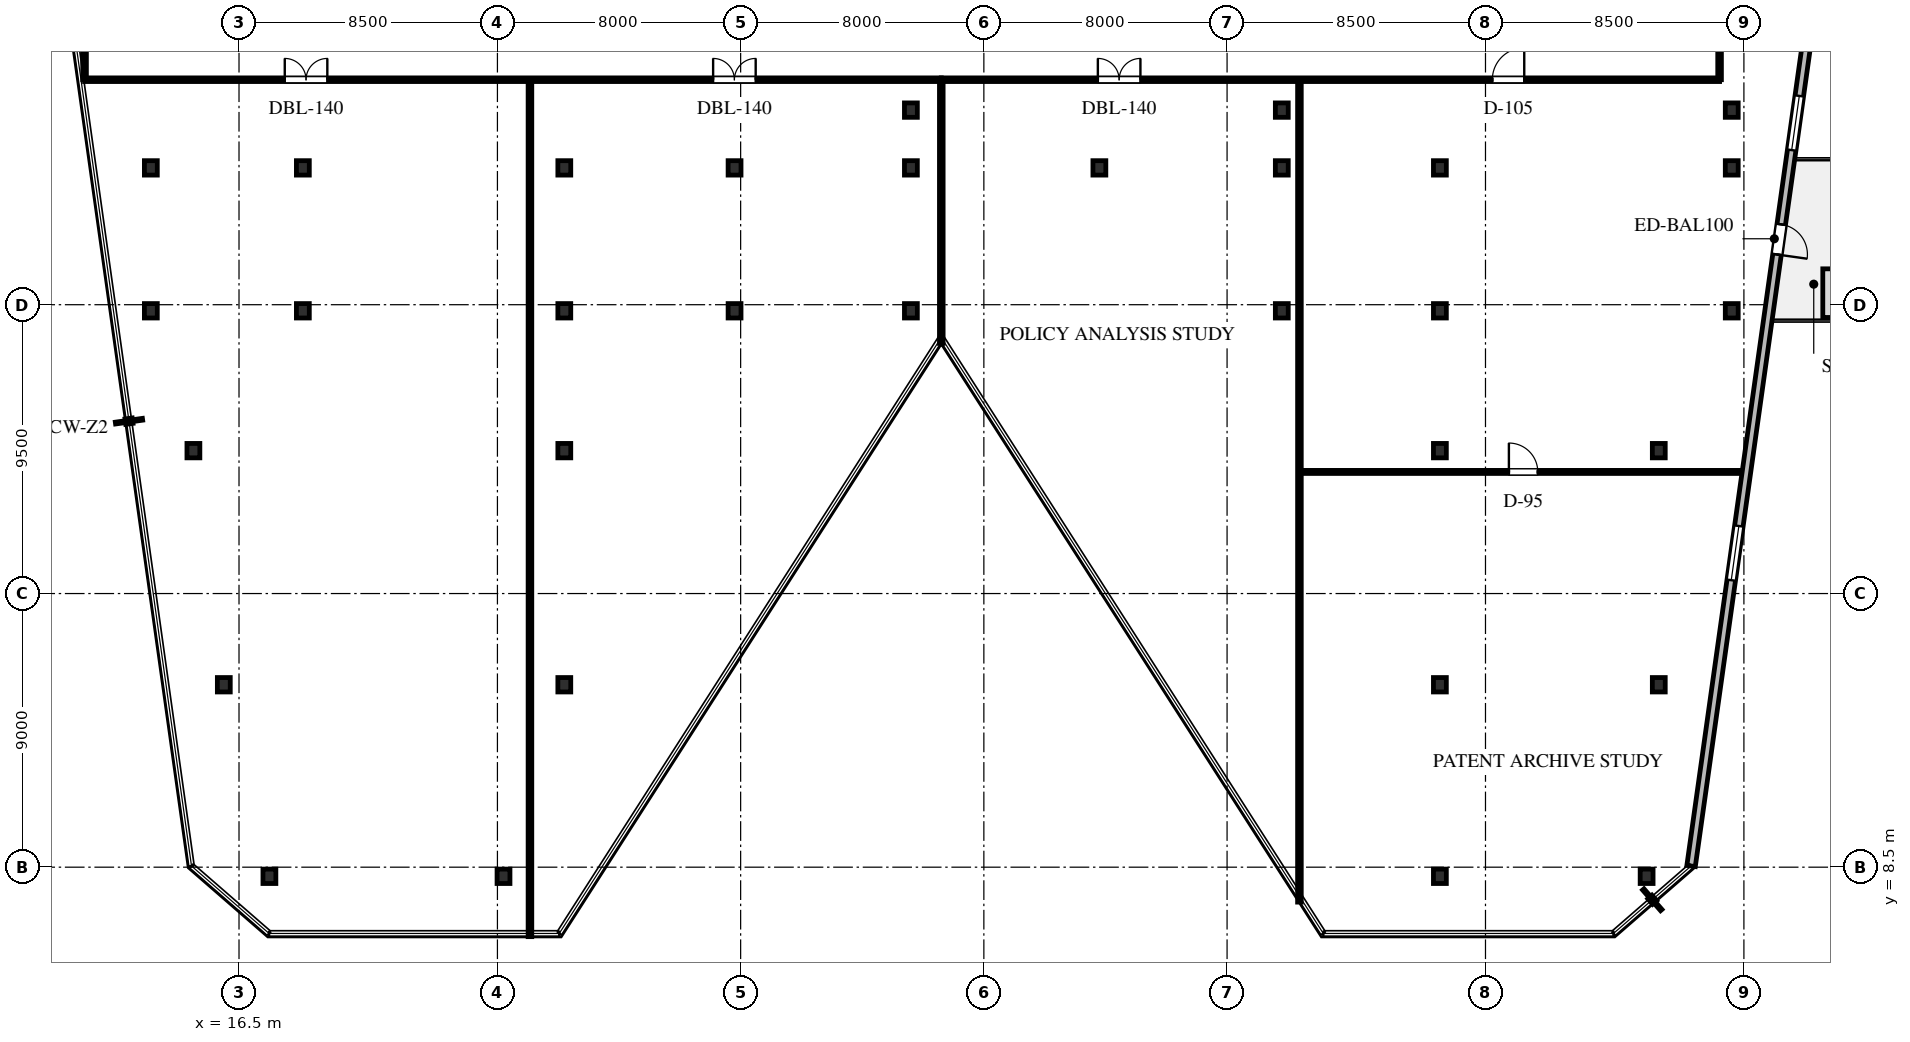
"""IFC4 building model, lengths in metres.
Left out: names, types, materials, properties, quantities, classifications, styles, units other than length and angle.
Written with IfcOpenShell. Run it as: python <this file> out.ifc"""

import sys

from ifc_helpers import new_model, si_unit, direction, frame, frame_2d, origin, origin_2d, place, context, subcontext, project, spatial, rectangle, i_section, extrude, element, fill, save


model = new_model("IFC4")
c1 = context("Model", 3, precision=1e-05, world=origin(), true_north=direction((0.0, 1.0)))
c2 = subcontext(c1, "Body", "Model", "MODEL_VIEW")
j1 = project(units=[si_unit("LENGTHUNIT", "METRE"), si_unit("PLANEANGLEUNIT", "RADIAN")], contexts=[c1])
p1 = place(None, origin())
s1 = spatial("IfcSite", under=j1, at=p1, CompositionType="ELEMENT")
p2 = place(p1, origin())
s2 = spatial("IfcBuilding", under=s1, at=p2, CompositionType="ELEMENT")
p3 = place(p2, frame((0.0, 0.0, 124.0)))
s3 = spatial("IfcBuildingStorey", under=s2, at=p3, CompositionType="ELEMENT", Elevation=124.0)
for number, where, z_axis, x_axis in (
    (1, (17.5, 8.2, 0.0), (0.0, 0.0, 1.0), (1.0, 0.0, 0.0)),
    (2, (13.6, 26.8, 0.0), (0.0, 0.0, 1.0), (1.0, 0.0, 0.0)),
    (3, (18.6, 26.8, 0.0), (0.0, 0.0, 1.0), (1.0, 0.0, 0.0)),
    (4, (27.2, 26.8, 0.0), (0.0, 0.0, 1.0), (1.0, 0.0, 0.0)),
    (5, (32.8, 26.8, 0.0), (0.0, 0.0, 1.0), (1.0, 0.0, 0.0)),
    (6, (38.6, 26.8, 0.0), (0.0, 0.0, 1.0), (1.0, 0.0, 0.0)),
    (7, (50.8, 26.8, 0.0), (0.0, 0.0, 1.0), (1.0, 0.0, 0.0)),
    (8, (56.0, 26.8, 0.0), (0.0, 0.0, 1.0), (1.0, 0.0, 0.0)),
    (9, (65.6, 26.8, 0.0), (0.0, 0.0, 1.0), (1.0, 0.0, 0.0)),
    (10, (13.6, 31.5, 0.0), (0.0, 0.0, 1.0), (1.0, 0.0, 0.0)),
    (11, (18.6, 31.5, 0.0), (0.0, 0.0, 1.0), (1.0, 0.0, 0.0)),
    (12, (27.2, 31.5, 0.0), (0.0, 0.0, 1.0), (1.0, 0.0, 0.0)),
    (13, (25.2, 8.2, 0.0), (0.0, 0.0, 1.0), (1.0, 0.0, 0.0)),
    (14, (32.8, 31.5, 0.0), (0.0, 0.0, 1.0), (1.0, 0.0, 0.0)),
    (15, (38.6, 31.5, 0.0), (0.0, 0.0, 1.0), (1.0, 0.0, 0.0)),
    (16, (44.8, 31.5, 0.0), (0.0, 0.0, 1.0), (1.0, 0.0, 0.0)),
    (17, (50.8, 31.5, 0.0), (0.0, 0.0, 1.0), (1.0, 0.0, 0.0)),
    (18, (56.0, 31.5, 0.0), (0.0, 0.0, 1.0), (1.0, 0.0, 0.0)),
    (19, (65.6, 31.5, 0.0), (0.0, 0.0, 1.0), (1.0, 0.0, 0.0)),
    (20, (56.0, 8.2, 0.0), (0.0, 0.0, 1.0), (1.0, 0.0, 0.0)),
    (21, (62.8, 8.2, 0.0), (0.0, 0.0, 1.0), (1.0, 0.0, 0.0)),
    (22, (16.0, 14.5, 0.0), (0.0, 0.0, 1.0), (1.0, 0.0, 0.0)),
    (23, (27.2, 14.5, 0.0), (0.0, 0.0, 1.0), (1.0, 0.0, 0.0)),
    (24, (56.0, 14.5, 0.0), (0.0, 0.0, 1.0), (1.0, 0.0, 0.0)),
    (25, (63.2, 14.5, 0.0), (0.0, 0.0, 1.0), (1.0, 0.0, 0.0)),
    (26, (15.0, 22.2, 0.0), (0.0, 0.0, 1.0), (1.0, 0.0, 0.0)),
    (27, (27.2, 22.2, 0.0), (0.0, 0.0, 1.0), (1.0, 0.0, 0.0)),
    (28, (56.0, 22.2, 0.0), (0.0, 0.0, 1.0), (1.0, 0.0, 0.0)),
    (29, (63.2, 22.2, 0.0), (0.0, 0.0, 1.0), (1.0, 0.0, 0.0)),
    (30, (38.6, 33.4, 0.0), (0.0, 0.0, 1.0), (1.0, 0.0, 0.0)),
    (31, (50.8, 33.4, 0.0), (0.0, 0.0, 1.0), (1.0, 0.0, 0.0)),
    (32, (65.6, 33.4, 0.0), (0.0, 0.0, 1.0), (1.0, 0.0, 0.0)),
):
    element("IfcColumn", number, at=place(p3, frame(where, z_axis=z_axis, x_axis=x_axis)), inside=s3, PredefinedType="COLUMN", context=c2, shape_type="SweptSolid", body=[
        extrude(i_section(OverallWidth=0.424, OverallDepth=0.474, WebThickness=0.048, FlangeThickness=0.077, FilletRadius=0.03, at=origin_2d()), origin(), (0.0, 0.0, 1.0), 4.0),
    ])
p4 = place(p3, frame((68.375, 37.8, 0.0), z_axis=(0.0, 0.0, 1.0), x_axis=(-0.13917001236, -0.990268502811, 0.0)))
e33 = element("IfcWall", 33, at=p4, inside=s3, PredefinedType="STANDARD", context=c2, shape_type="SweptSolid", body=[
    extrude(rectangle(XDim=29.549, YDim=0.28, at=frame_2d((14.774, 0.0))), origin(), (0.0, 0.0, 1.0), 3.75),
])
p5 = place(p4, frame((8.238, 0.0, 0.0)))
e34 = element("IfcOpeningElement", 34, at=p5, cuts=e33, PredefinedType="OPENING", context=c2, shape_type="SweptSolid", body=[
    extrude(rectangle(XDim=1.0, YDim=2.15, at=frame_2d((0.5, 1.075))), frame((0.0, 0.15, 0.0), z_axis=(0.0, -1.0, 0.0), x_axis=(1.0, 0.0, 0.0)), (0.0, 0.0, 1.0), 0.3),
])
p6 = place(p4, frame((3.971, 0.0, 0.65)))
e35 = element("IfcOpeningElement", 35, at=p6, cuts=e33, PredefinedType="OPENING", context=c2, shape_type="SweptSolid", body=[
    extrude(rectangle(XDim=1.8, YDim=2.1, at=frame_2d((0.9, 1.05))), frame((0.0, 0.15, 0.0), z_axis=(0.0, -1.0, 0.0), x_axis=(1.0, 0.0, 0.0)), (0.0, 0.0, 1.0), 0.3),
])
p7 = place(p4, frame((18.256, 0.0, 0.65)))
e36 = element("IfcOpeningElement", 36, at=p7, cuts=e33, PredefinedType="OPENING", context=c2, shape_type="SweptSolid", body=[
    extrude(rectangle(XDim=1.8, YDim=2.1, at=frame_2d((0.9, 1.05))), frame((0.0, 0.15, 0.0), z_axis=(0.0, -1.0, 0.0), x_axis=(1.0, 0.0, 0.0)), (0.0, 0.0, 1.0), 0.3),
])
p8 = place(p3, frame((11.42, 34.4, 0.0), z_axis=(0.0, 0.0, 1.0), x_axis=(1.0, 0.0, 0.0)))
e37 = element("IfcWall", 37, at=p8, inside=s3, PredefinedType="PARTITIONING", context=c2, shape_type="SweptSolid", body=[
    extrude(rectangle(XDim=28.18, YDim=0.12, at=frame_2d((14.09, 0.0))), origin(), (0.0, 0.0, 1.0), 2.894),
])
p9 = place(p8, frame((6.585, 0.0, 0.0)))
e38 = element("IfcOpeningElement", 38, at=p9, cuts=e37, PredefinedType="OPENING", context=c2, shape_type="SweptSolid", body=[
    extrude(rectangle(XDim=1.4, YDim=2.2, at=frame_2d((0.7, 1.1))), frame((0.0, 0.07, 0.0), z_axis=(0.0, -1.0, 0.0), x_axis=(1.0, 0.0, 0.0)), (0.0, 0.0, 1.0), 0.14),
])
p10 = place(p8, frame((20.675, 0.0, 0.0)))
e39 = element("IfcOpeningElement", 39, at=p10, cuts=e37, PredefinedType="OPENING", context=c2, shape_type="SweptSolid", body=[
    extrude(rectangle(XDim=1.4, YDim=2.2, at=frame_2d((0.7, 1.1))), frame((0.0, 0.07, 0.0), z_axis=(0.0, -1.0, 0.0), x_axis=(1.0, 0.0, 0.0)), (0.0, 0.0, 1.0), 0.14),
])
p11 = place(p3, frame((39.6, 34.4, 0.0), z_axis=(0.0, 0.0, 1.0), x_axis=(1.0, 0.0, 0.0)))
e40 = element("IfcWall", 40, at=p11, inside=s3, PredefinedType="PARTITIONING", context=c2, shape_type="SweptSolid", body=[
    extrude(rectangle(XDim=25.6, YDim=0.12, at=frame_2d((12.8, 0.0))), origin(), (0.0, 0.0, 1.0), 2.894),
])
p12 = place(p11, frame((5.15, 0.0, 0.0)))
e41 = element("IfcOpeningElement", 41, at=p12, cuts=e40, PredefinedType="OPENING", context=c2, shape_type="SweptSolid", body=[
    extrude(rectangle(XDim=1.4, YDim=2.2, at=frame_2d((0.7, 1.1))), frame((0.0, 0.07, 0.0), z_axis=(0.0, -1.0, 0.0), x_axis=(1.0, 0.0, 0.0)), (0.0, 0.0, 1.0), 0.14),
])
p13 = place(p11, frame((18.125, 0.0, 0.0)))
e42 = element("IfcOpeningElement", 42, at=p13, cuts=e40, PredefinedType="OPENING", context=c2, shape_type="SweptSolid", body=[
    extrude(rectangle(XDim=1.05, YDim=2.2, at=frame_2d((0.525, 1.1))), frame((0.0, 0.07, 0.0), z_axis=(0.0, -1.0, 0.0), x_axis=(1.0, 0.0, 0.0)), (0.0, 0.0, 1.0), 0.14),
])
p14 = place(p3, frame((11.42, 34.4, 0.0), z_axis=(0.0, 0.0, 1.0), x_axis=(0.0, 1.0, 0.0)))
e43 = element("IfcWall", 43, at=p14, inside=s3, PredefinedType="PARTITIONING", context=c2, shape_type="SweptSolid", body=[
    extrude(rectangle(XDim=3.65, YDim=0.12, at=frame_2d((1.825, 0.0))), origin(), (0.0, 0.0, 1.0), 3.75),
])
p15 = place(p3, frame((65.2, 34.4, 0.0), z_axis=(0.0, 0.0, 1.0), x_axis=(0.0, 1.0, 0.0)))
e44 = element("IfcWall", 44, at=p15, inside=s3, PredefinedType="PARTITIONING", context=c2, shape_type="SweptSolid", body=[
    extrude(rectangle(XDim=3.267, YDim=0.12, at=frame_2d((1.634, 0.0))), origin(), (0.0, 0.0, 1.0), 2.894),
])
p16 = place(p3, frame((39.6, 25.728, 0.0), z_axis=(0.0, 0.0, 1.0), x_axis=(0.0, 1.0, 0.0)))
e45 = element("IfcWall", 45, at=p16, inside=s3, PredefinedType="PARTITIONING", context=c2, shape_type="SweptSolid", body=[
    extrude(rectangle(XDim=8.672, YDim=0.12, at=frame_2d((4.336, 0.0))), origin(), (0.0, 0.0, 1.0), 2.894),
])
p17 = place(p3, frame((26.07, 6.215, 0.0), z_axis=(0.0, 0.0, 1.0), x_axis=(0.0, 1.0, 0.0)))
e46 = element("IfcWall", 46, at=p17, inside=s3, PredefinedType="PARTITIONING", context=c2, shape_type="SweptSolid", body=[
    extrude(rectangle(XDim=28.117, YDim=0.12, at=frame_2d((14.059, 0.0))), origin(), (0.0, 0.0, 1.0), 2.894),
])
p18 = place(p3, frame((51.38, 7.351, 0.0), z_axis=(0.0, 0.0, 1.0), x_axis=(0.0, 1.0, 0.0)))
e47 = element("IfcWall", 47, at=p18, inside=s3, PredefinedType="PARTITIONING", context=c2, shape_type="SweptSolid", body=[
    extrude(rectangle(XDim=26.981, YDim=0.12, at=frame_2d((13.49, 0.0))), origin(), (0.0, 0.0, 1.0), 2.894),
])
p19 = place(p3, frame((51.448, 21.5, 0.0), z_axis=(0.0, 0.0, 1.0), x_axis=(1.0, 0.0, 0.0)))
e48 = element("IfcWall", 48, at=p19, inside=s3, PredefinedType="PARTITIONING", context=c2, shape_type="SweptSolid", body=[
    extrude(rectangle(XDim=14.469, YDim=0.1, at=frame_2d((7.235, 0.0))), origin(), (0.0, 0.0, 1.0), 2.894),
])
p20 = place(p19, frame((6.822, 0.0, 0.0)))
e49 = element("IfcOpeningElement", 49, at=p20, cuts=e48, PredefinedType="OPENING", context=c2, shape_type="SweptSolid", body=[
    extrude(rectangle(XDim=0.95, YDim=2.15, at=frame_2d((0.475, 1.075))), frame((0.0, 0.06, 0.0), z_axis=(0.0, -1.0, 0.0), x_axis=(1.0, 0.0, 0.0)), (0.0, 0.0, 1.0), 0.12),
])
p21 = place(p5, origin())
e50 = element("IfcDoor", 50, at=p21, inside=s3, OperationType="SINGLE_SWING_RIGHT", PredefinedType="DOOR", context=c2, shape_type="SweptSolid", body=[
    extrude(rectangle(XDim=1.0, YDim=2.15, at=frame_2d((0.5, 1.075))), frame((0.0, 0.025, 0.0), z_axis=(0.0, -1.0, 0.0), x_axis=(1.0, 0.0, 0.0)), (0.0, 0.0, 1.0), 0.05),
])
fill(e34, e50)
p22 = place(p6, origin())
e51 = element("IfcWindow", 51, at=p22, inside=s3, PartitioningType="SINGLE_PANEL", PredefinedType="WINDOW", context=c2, shape_type="SweptSolid", body=[
    extrude(rectangle(XDim=1.8, YDim=2.1, at=frame_2d((0.9, 1.05))), frame((0.0, 0.03, 0.0), z_axis=(0.0, -1.0, 0.0), x_axis=(1.0, 0.0, 0.0)), (0.0, 0.0, 1.0), 0.06),
])
fill(e35, e51)
p23 = place(p7, origin())
e52 = element("IfcWindow", 52, at=p23, inside=s3, PartitioningType="SINGLE_PANEL", PredefinedType="WINDOW", context=c2, shape_type="SweptSolid", body=[
    extrude(rectangle(XDim=1.8, YDim=2.1, at=frame_2d((0.9, 1.05))), frame((0.0, 0.03, 0.0), z_axis=(0.0, -1.0, 0.0), x_axis=(1.0, 0.0, 0.0)), (0.0, 0.0, 1.0), 0.06),
])
fill(e36, e52)
p24 = place(p9, origin())
e53 = element("IfcDoor", 53, at=p24, inside=s3, OperationType="DOUBLE_DOOR_SINGLE_SWING", PredefinedType="DOOR", context=c2, shape_type="SweptSolid", body=[
    extrude(rectangle(XDim=1.4, YDim=2.2, at=frame_2d((0.7, 1.1))), frame((0.0, 0.025, 0.0), z_axis=(0.0, -1.0, 0.0), x_axis=(1.0, 0.0, 0.0)), (0.0, 0.0, 1.0), 0.05),
])
fill(e38, e53)
p25 = place(p10, origin())
e54 = element("IfcDoor", 54, at=p25, inside=s3, OperationType="DOUBLE_DOOR_SINGLE_SWING", PredefinedType="DOOR", context=c2, shape_type="SweptSolid", body=[
    extrude(rectangle(XDim=1.4, YDim=2.2, at=frame_2d((0.7, 1.1))), frame((0.0, 0.025, 0.0), z_axis=(0.0, -1.0, 0.0), x_axis=(1.0, 0.0, 0.0)), (0.0, 0.0, 1.0), 0.05),
])
fill(e39, e54)
p26 = place(p12, origin())
e55 = element("IfcDoor", 55, at=p26, inside=s3, OperationType="DOUBLE_DOOR_SINGLE_SWING", PredefinedType="DOOR", context=c2, shape_type="SweptSolid", body=[
    extrude(rectangle(XDim=1.4, YDim=2.2, at=frame_2d((0.7, 1.1))), frame((0.0, 0.025, 0.0), z_axis=(0.0, -1.0, 0.0), x_axis=(1.0, 0.0, 0.0)), (0.0, 0.0, 1.0), 0.05),
])
fill(e41, e55)
p27 = place(p13, origin())
e56 = element("IfcDoor", 56, at=p27, inside=s3, OperationType="SINGLE_SWING_RIGHT", PredefinedType="DOOR", context=c2, shape_type="SweptSolid", body=[
    extrude(rectangle(XDim=1.05, YDim=2.2, at=frame_2d((0.525, 1.1))), frame((0.0, 0.025, 0.0), z_axis=(0.0, -1.0, 0.0), x_axis=(1.0, 0.0, 0.0)), (0.0, 0.0, 1.0), 0.05),
])
fill(e42, e56)
p28 = place(p20, origin())
e57 = element("IfcDoor", 57, at=p28, inside=s3, OperationType="SINGLE_SWING_LEFT", PredefinedType="DOOR", context=c2, shape_type="SweptSolid", body=[
    extrude(rectangle(XDim=0.95, YDim=2.15, at=frame_2d((0.475, 1.075))), frame((0.0, 0.025, 0.0), z_axis=(0.0, -1.0, 0.0), x_axis=(1.0, 0.0, 0.0)), (0.0, 0.0, 1.0), 0.05),
])
fill(e49, e57)
save(model, sys.argv[1])
